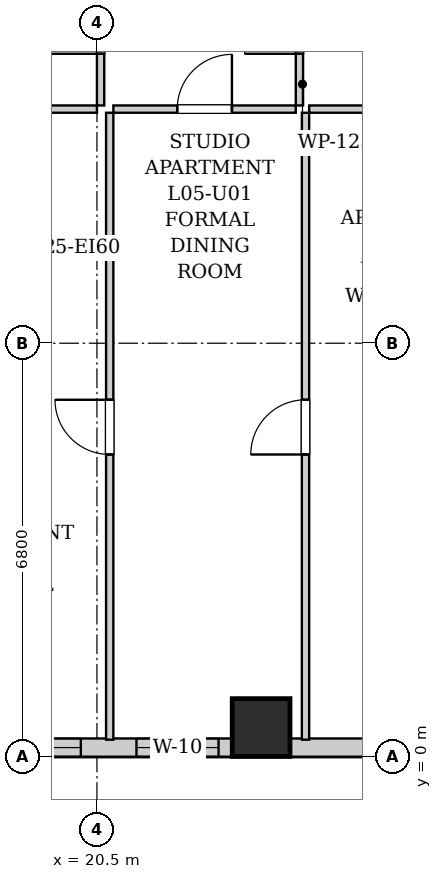
"""IFC4 building model, lengths in metres.
Left out: names, types, materials, properties, quantities, classifications, styles, units other than length and angle.
Written with IfcOpenShell. Run it as: python <this file> out.ifc"""

import sys

from ifc_helpers import new_model, si_unit, direction, frame, frame_2d, origin, origin_2d, place, context, subcontext, project, spatial, rectangle, extrude, element, fill, save


model = new_model("IFC4")
c1 = context("Model", 3, precision=1e-05, world=origin(), true_north=direction((0.0, 1.0)))
c2 = subcontext(c1, "Body", "Model", "MODEL_VIEW")
j1 = project(units=[si_unit("LENGTHUNIT", "METRE"), si_unit("PLANEANGLEUNIT", "RADIAN")], contexts=[c1])
p1 = place(None, origin())
s1 = spatial("IfcSite", under=j1, at=p1, CompositionType="ELEMENT")
p2 = place(p1, origin())
s2 = spatial("IfcBuilding", under=s1, at=p2, CompositionType="ELEMENT")
p3 = place(p2, frame((0.0, 0.0, 25.8)))
s3 = spatial("IfcBuildingStorey", under=s2, at=p3, CompositionType="ELEMENT", Elevation=25.8)
p4 = place(p3, frame((23.2, 0.48, 0.0), z_axis=(0.0, 0.0, 1.0), x_axis=(1.0, 0.0, 0.0)))
e1 = element("IfcColumn", 1, at=p4, inside=s3, PredefinedType="COLUMN", context=c2, shape_type="SweptSolid", body=[
    extrude(rectangle(XDim=0.95, YDim=0.95, at=origin_2d()), origin(), (0.0, 0.0, 1.0), 3.2),
])
p5 = place(p3, frame((44.0, 0.15, 0.0), z_axis=(0.0, 0.0, 1.0), x_axis=(-1.0, 0.0, 0.0)))
e2 = element("IfcWall", 2, at=p5, inside=s3, PredefinedType="SOLIDWALL", context=c2, shape_type="SweptSolid", body=[
    extrude(rectangle(XDim=28.1, YDim=0.3, at=frame_2d((14.05, 0.0))), origin(), (0.0, 0.0, 1.0), 1.975),
])
p6 = place(p5, frame((26.835, 0.0, 0.55)))
e3 = element("IfcOpeningElement", 3, at=p6, cuts=e2, PredefinedType="OPENING", context=c2, shape_type="SweptSolid", body=[
    extrude(rectangle(XDim=0.85, YDim=1.2, at=frame_2d((0.425, 0.6))), frame((0.0, 0.16, 0.0), z_axis=(0.0, -1.0, 0.0), x_axis=(1.0, 0.0, 0.0)), (0.0, 0.0, 1.0), 0.32),
])
p7 = place(p5, frame((23.765, 0.0, 0.55)))
e4 = element("IfcOpeningElement", 4, at=p7, cuts=e2, PredefinedType="OPENING", context=c2, shape_type="SweptSolid", body=[
    extrude(rectangle(XDim=1.8, YDim=1.2, at=frame_2d((0.9, 0.6))), frame((0.0, 0.16, 0.0), z_axis=(0.0, -1.0, 0.0), x_axis=(1.0, 0.0, 0.0)), (0.0, 0.0, 1.0), 0.32),
])
p8 = place(p5, frame((21.5, 0.0, 0.55)))
e5 = element("IfcOpeningElement", 5, at=p8, cuts=e2, PredefinedType="OPENING", context=c2, shape_type="SweptSolid", body=[
    extrude(rectangle(XDim=1.35, YDim=1.2, at=frame_2d((0.675, 0.6))), frame((0.0, 0.16, 0.0), z_axis=(0.0, -1.0, 0.0), x_axis=(1.0, 0.0, 0.0)), (0.0, 0.0, 1.0), 0.32),
])
p9 = place(p5, frame((14.352, 0.0, 0.55)))
e6 = element("IfcOpeningElement", 6, at=p9, cuts=e2, PredefinedType="OPENING", context=c2, shape_type="SweptSolid", body=[
    extrude(rectangle(XDim=1.8, YDim=1.2, at=frame_2d((0.9, 0.6))), frame((0.0, 0.16, 0.0), z_axis=(0.0, -1.0, 0.0), x_axis=(1.0, 0.0, 0.0)), (0.0, 0.0, 1.0), 0.32),
])
p10 = place(p5, frame((11.435, 0.0, 0.55)))
e7 = element("IfcOpeningElement", 7, at=p10, cuts=e2, PredefinedType="OPENING", context=c2, shape_type="SweptSolid", body=[
    extrude(rectangle(XDim=1.8, YDim=1.2, at=frame_2d((0.9, 0.6))), frame((0.0, 0.16, 0.0), z_axis=(0.0, -1.0, 0.0), x_axis=(1.0, 0.0, 0.0)), (0.0, 0.0, 1.0), 0.32),
])
p11 = place(p5, frame((7.891, 0.0, 0.55)))
e8 = element("IfcOpeningElement", 8, at=p11, cuts=e2, PredefinedType="OPENING", context=c2, shape_type="SweptSolid", body=[
    extrude(rectangle(XDim=1.8, YDim=1.2, at=frame_2d((0.9, 0.6))), frame((0.0, 0.16, 0.0), z_axis=(0.0, -1.0, 0.0), x_axis=(1.0, 0.0, 0.0)), (0.0, 0.0, 1.0), 0.32),
])
p12 = place(p5, frame((4.315, 0.0, 0.55)))
e9 = element("IfcOpeningElement", 9, at=p12, cuts=e2, PredefinedType="OPENING", context=c2, shape_type="SweptSolid", body=[
    extrude(rectangle(XDim=0.85, YDim=1.2, at=frame_2d((0.425, 0.6))), frame((0.0, 0.16, 0.0), z_axis=(0.0, -1.0, 0.0), x_axis=(1.0, 0.0, 0.0)), (0.0, 0.0, 1.0), 0.32),
])
p13 = place(p3, frame((20.56, 10.71, 0.0), z_axis=(0.0, 0.0, 1.0), x_axis=(0.0, 1.0, 0.0)))
e10 = element("IfcWall", 10, at=p13, inside=s3, PredefinedType="PARTITIONING", context=c2, shape_type="SweptSolid", body=[
    extrude(rectangle(XDim=2.6, YDim=0.12, at=frame_2d((1.3, 0.0))), origin(), (0.0, 0.0, 1.0), 2.94),
])
p14 = place(p13, frame((0.85, 0.0, 0.0)))
e11 = element("IfcOpeningElement", 11, at=p14, cuts=e10, PredefinedType="OPENING", context=c2, shape_type="SweptSolid", body=[
    extrude(rectangle(XDim=0.9, YDim=2.05, at=frame_2d((0.45, 1.025))), frame((0.0, 0.07, 0.0), z_axis=(0.0, -1.0, 0.0), x_axis=(1.0, 0.0, 0.0)), (0.0, 0.0, 1.0), 0.14),
])
p15 = place(p3, frame((17.55, 10.65, 0.0), z_axis=(0.0, 0.0, 1.0), x_axis=(1.0, 0.0, 0.0)))
e12 = element("IfcWall", 12, at=p15, inside=s3, PredefinedType="PARTITIONING", context=c2, shape_type="SweptSolid", body=[
    extrude(rectangle(XDim=2.95, YDim=0.12, at=frame_2d((1.475, 0.0))), origin(), (0.0, 0.0, 1.0), 2.94),
])
p16 = place(p15, frame((1.025, 0.0, 0.0)))
e13 = element("IfcOpeningElement", 13, at=p16, cuts=e12, PredefinedType="OPENING", context=c2, shape_type="SweptSolid", body=[
    extrude(rectangle(XDim=0.9, YDim=2.05, at=frame_2d((0.45, 1.025))), frame((0.0, 0.07, 0.0), z_axis=(0.0, -1.0, 0.0), x_axis=(1.0, 0.0, 0.0)), (0.0, 0.0, 1.0), 0.14),
])
p17 = place(p3, frame((23.83, 10.71, 0.0), z_axis=(0.0, 0.0, 1.0), x_axis=(0.0, 1.0, 0.0)))
e14 = element("IfcWall", 14, at=p17, inside=s3, PredefinedType="PARTITIONING", context=c2, shape_type="SweptSolid", body=[
    extrude(rectangle(XDim=2.6, YDim=0.12, at=frame_2d((1.3, 0.0))), origin(), (0.0, 0.0, 1.0), 2.94),
])
p18 = place(p17, frame((0.85, 0.0, 0.0)))
e15 = element("IfcOpeningElement", 15, at=p18, cuts=e14, PredefinedType="OPENING", context=c2, shape_type="SweptSolid", body=[
    extrude(rectangle(XDim=0.9, YDim=2.05, at=frame_2d((0.45, 1.025))), frame((0.0, 0.07, 0.0), z_axis=(0.0, -1.0, 0.0), x_axis=(1.0, 0.0, 0.0)), (0.0, 0.0, 1.0), 0.14),
])
p19 = place(p3, frame((20.77, 10.65, 0.0), z_axis=(0.0, 0.0, 1.0), x_axis=(1.0, 0.0, 0.0)))
e16 = element("IfcWall", 16, at=p19, inside=s3, PredefinedType="PARTITIONING", context=c2, shape_type="SweptSolid", body=[
    extrude(rectangle(XDim=3.0, YDim=0.12, at=frame_2d((1.5, 0.0))), origin(), (0.0, 0.0, 1.0), 2.94),
])
p20 = place(p19, frame((1.05, 0.0, 0.0)))
e17 = element("IfcOpeningElement", 17, at=p20, cuts=e16, PredefinedType="OPENING", context=c2, shape_type="SweptSolid", body=[
    extrude(rectangle(XDim=0.9, YDim=2.05, at=frame_2d((0.45, 1.025))), frame((0.0, 0.07, 0.0), z_axis=(0.0, -1.0, 0.0), x_axis=(1.0, 0.0, 0.0)), (0.0, 0.0, 1.0), 0.14),
])
p21 = place(p3, frame((23.99, 10.65, 0.0), z_axis=(0.0, 0.0, 1.0), x_axis=(1.0, 0.0, 0.0)))
e18 = element("IfcWall", 18, at=p21, inside=s3, PredefinedType="PARTITIONING", context=c2, shape_type="SweptSolid", body=[
    extrude(rectangle(XDim=3.1, YDim=0.12, at=frame_2d((1.55, 0.0))), origin(), (0.0, 0.0, 1.0), 2.94),
])
p22 = place(p21, frame((1.1, 0.0, 0.0)))
e19 = element("IfcOpeningElement", 19, at=p22, cuts=e18, PredefinedType="OPENING", context=c2, shape_type="SweptSolid", body=[
    extrude(rectangle(XDim=0.9, YDim=2.05, at=frame_2d((0.45, 1.025))), frame((0.0, 0.07, 0.0), z_axis=(0.0, -1.0, 0.0), x_axis=(1.0, 0.0, 0.0)), (0.0, 0.0, 1.0), 0.14),
])
p23 = place(p3, frame((20.71, 0.28, 0.0), z_axis=(0.0, 0.0, 1.0), x_axis=(0.0, 1.0, 0.0)))
e20 = element("IfcWall", 20, at=p23, inside=s3, PredefinedType="PARTITIONING", context=c2, shape_type="SweptSolid", body=[
    extrude(rectangle(XDim=10.31, YDim=0.12, at=frame_2d((5.155, 0.0))), origin(), (0.0, 0.0, 1.0), 2.94),
])
p24 = place(p23, frame((4.69, 0.0, 0.0)))
e21 = element("IfcOpeningElement", 21, at=p24, cuts=e20, PredefinedType="OPENING", context=c2, shape_type="SweptSolid", body=[
    extrude(rectangle(XDim=0.9, YDim=2.05, at=frame_2d((0.45, 1.025))), frame((0.0, 0.07, 0.0), z_axis=(0.0, -1.0, 0.0), x_axis=(1.0, 0.0, 0.0)), (0.0, 0.0, 1.0), 0.14),
])
p25 = place(p3, frame((23.93, 0.28, 0.0), z_axis=(0.0, 0.0, 1.0), x_axis=(0.0, 1.0, 0.0)))
e22 = element("IfcWall", 22, at=p25, inside=s3, PredefinedType="PARTITIONING", context=c2, shape_type="SweptSolid", body=[
    extrude(rectangle(XDim=10.31, YDim=0.12, at=frame_2d((5.155, 0.0))), origin(), (0.0, 0.0, 1.0), 2.94),
])
p26 = place(p25, frame((4.69, 0.0, 0.0)))
e23 = element("IfcOpeningElement", 23, at=p26, cuts=e22, PredefinedType="OPENING", context=c2, shape_type="SweptSolid", body=[
    extrude(rectangle(XDim=0.9, YDim=2.05, at=frame_2d((0.45, 1.025))), frame((0.0, 0.07, 0.0), z_axis=(0.0, -1.0, 0.0), x_axis=(1.0, 0.0, 0.0)), (0.0, 0.0, 1.0), 0.14),
])
p27 = place(p14, origin())
e24 = element("IfcDoor", 24, at=p27, inside=s3, OperationType="SINGLE_SWING_LEFT", PredefinedType="DOOR", context=c2, shape_type="SweptSolid", body=[
    extrude(rectangle(XDim=0.9, YDim=2.05, at=frame_2d((0.45, 1.025))), frame((0.0, 0.025, 0.0), z_axis=(0.0, -1.0, 0.0), x_axis=(1.0, 0.0, 0.0)), (0.0, 0.0, 1.0), 0.05),
])
fill(e11, e24)
p28 = place(p18, origin())
e25 = element("IfcDoor", 25, at=p28, inside=s3, OperationType="SINGLE_SWING_LEFT", PredefinedType="DOOR", context=c2, shape_type="SweptSolid", body=[
    extrude(rectangle(XDim=0.9, YDim=2.05, at=frame_2d((0.45, 1.025))), frame((0.0, 0.025, 0.0), z_axis=(0.0, -1.0, 0.0), x_axis=(1.0, 0.0, 0.0)), (0.0, 0.0, 1.0), 0.05),
])
fill(e15, e25)
p29 = place(p20, origin())
e26 = element("IfcDoor", 26, at=p29, inside=s3, OperationType="SINGLE_SWING_RIGHT", PredefinedType="DOOR", context=c2, shape_type="SweptSolid", body=[
    extrude(rectangle(XDim=0.9, YDim=2.05, at=frame_2d((0.45, 1.025))), frame((0.0, 0.025, 0.0), z_axis=(0.0, -1.0, 0.0), x_axis=(1.0, 0.0, 0.0)), (0.0, 0.0, 1.0), 0.05),
])
fill(e17, e26)
p30 = place(p24, origin())
e27 = element("IfcDoor", 27, at=p30, inside=s3, OperationType="SINGLE_SWING_RIGHT", PredefinedType="DOOR", context=c2, shape_type="SweptSolid", body=[
    extrude(rectangle(XDim=0.9, YDim=2.05, at=frame_2d((0.45, 1.025))), frame((0.0, 0.025, 0.0), z_axis=(0.0, -1.0, 0.0), x_axis=(1.0, 0.0, 0.0)), (0.0, 0.0, 1.0), 0.05),
])
fill(e21, e27)
p31 = place(p26, origin())
e28 = element("IfcDoor", 28, at=p31, inside=s3, OperationType="SINGLE_SWING_LEFT", PredefinedType="DOOR", context=c2, shape_type="SweptSolid", body=[
    extrude(rectangle(XDim=0.9, YDim=2.05, at=frame_2d((0.45, 1.025))), frame((0.0, 0.025, 0.0), z_axis=(0.0, -1.0, 0.0), x_axis=(1.0, 0.0, 0.0)), (0.0, 0.0, 1.0), 0.05),
])
fill(e23, e28)
p32 = place(p7, origin())
e29 = element("IfcWindow", 29, at=p32, inside=s3, PartitioningType="DOUBLE_PANEL_VERTICAL", PredefinedType="WINDOW", context=c2, shape_type="SweptSolid", body=[
    extrude(rectangle(XDim=1.8, YDim=1.2, at=frame_2d((0.9, 0.6))), frame((0.0, 0.03, 0.0), z_axis=(0.0, -1.0, 0.0), x_axis=(1.0, 0.0, 0.0)), (0.0, 0.0, 1.0), 0.06),
])
fill(e4, e29)
p33 = place(p8, origin())
e30 = element("IfcWindow", 30, at=p33, inside=s3, PartitioningType="SINGLE_PANEL", PredefinedType="WINDOW", context=c2, shape_type="SweptSolid", body=[
    extrude(rectangle(XDim=1.35, YDim=1.2, at=frame_2d((0.675, 0.6))), frame((0.0, 0.03, 0.0), z_axis=(0.0, -1.0, 0.0), x_axis=(1.0, 0.0, 0.0)), (0.0, 0.0, 1.0), 0.06),
])
fill(e5, e30)
save(model, sys.argv[1])
